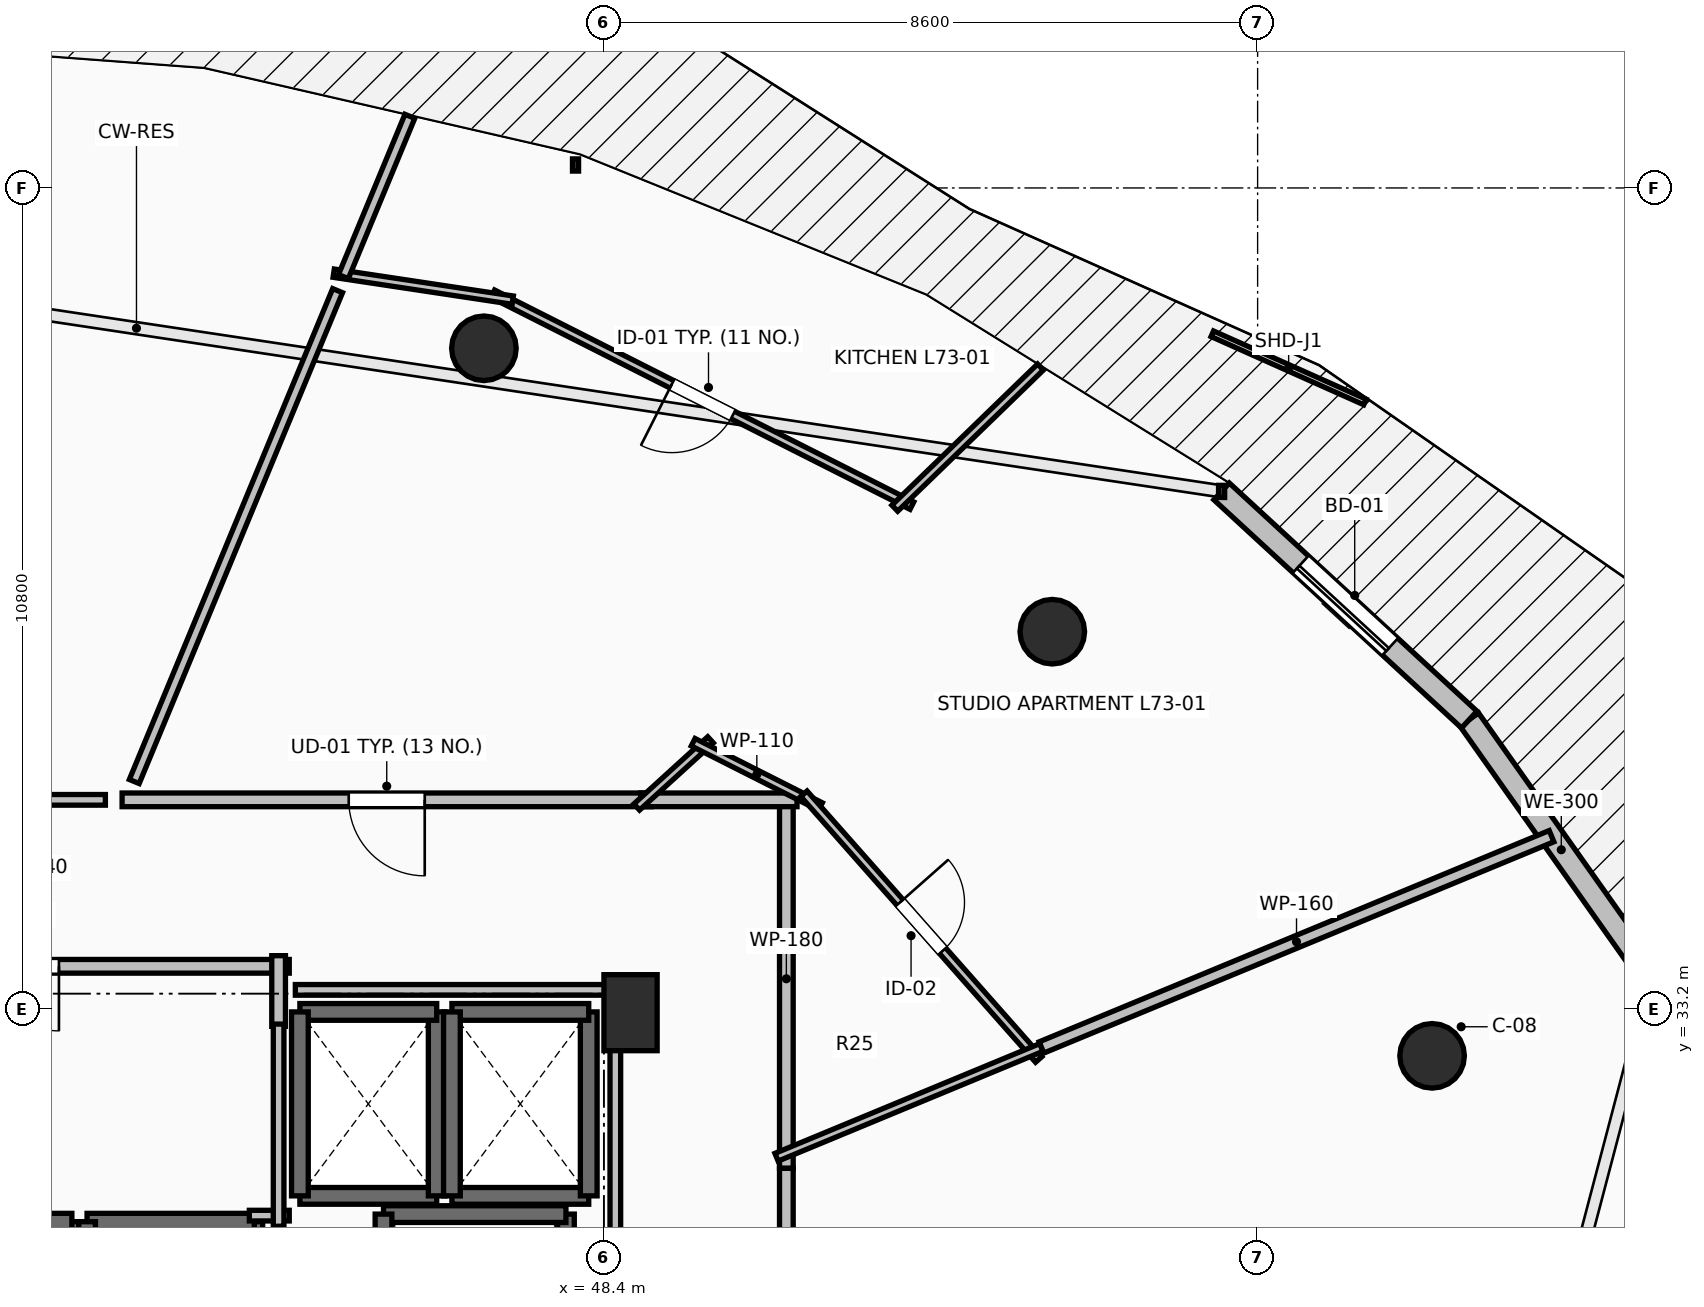
"""IFC4 building model, lengths in metres.
Left out: names, types, materials, properties, quantities, classifications, styles, units other than length and angle.
Written with IfcOpenShell. Run it as: python <this file> out.ifc"""

import sys

from ifc_helpers import new_model, si_unit, direction, frame, frame_2d, origin, origin_2d, place, context, subcontext, project, spatial, rectangle, circle, extrude, element, fill, save


model = new_model("IFC4")
c1 = context("Model", 3, precision=1e-05, world=origin(), true_north=direction((0.0, 1.0)))
c2 = subcontext(c1, "Body", "Model", "MODEL_VIEW")
j1 = project(units=[si_unit("LENGTHUNIT", "METRE"), si_unit("PLANEANGLEUNIT", "RADIAN")], contexts=[c1])
p1 = place(None, origin())
s1 = spatial("IfcSite", under=j1, at=p1, CompositionType="ELEMENT")
p2 = place(p1, origin())
s2 = spatial("IfcBuilding", under=s1, at=p2, CompositionType="ELEMENT")
p3 = place(p2, frame((0.0, 0.0, 269.75)))
s3 = spatial("IfcBuildingStorey", under=s2, at=p3, CompositionType="ELEMENT", Elevation=269.75)
for number, where, z_axis, x_axis in (
    (1, (59.295, 32.582, 0.0), (0.0, 0.0, 1.0), (0.924, 0.383, 0.0)),
    (2, (54.299, 38.162, 0.0), (0.0, 0.0, 1.0), (0.707, 0.707, 0.0)),
    (3, (46.821, 41.891, 0.0), (0.0, 0.0, 1.0), (0.383, 0.924, 0.0)),
):
    element("IfcColumn", number, at=place(p3, frame(where, z_axis=z_axis, x_axis=x_axis)), inside=s3, PredefinedType="COLUMN", context=c2, shape_type="SweptSolid", body=[
        extrude(circle(Radius=0.425, at=origin_2d()), origin(), (0.0, 0.0, 1.0), 3.55),
    ])
p4 = place(p3, frame((48.75, 33.15, 0.0), z_axis=(0.0, 0.0, 1.0), x_axis=(1.0, 0.0, 0.0)))
e4 = element("IfcColumn", 4, at=p4, inside=s3, PredefinedType="PILASTER", context=c2, shape_type="SweptSolid", body=[
    extrude(rectangle(XDim=0.7, YDim=1.0, at=origin_2d()), origin(), (0.0, 0.0, 1.0), 3.55),
])
p5 = place(p3, frame((62.206, 33.581, 0.0), z_axis=(0.0, 0.0, 1.0), x_axis=(-0.577261247247, 0.816559521668, 0.0)))
e5 = element("IfcWall", 5, at=p5, inside=s3, PredefinedType="STANDARD", context=c2, shape_type="SweptSolid", body=[
    extrude(rectangle(XDim=4.194, YDim=0.3, at=frame_2d((2.097, 0.0))), origin(), (0.0, 0.0, 1.0), 3.29),
])
p6 = place(p3, frame((59.784, 37.006, 0.0), z_axis=(0.0, 0.0, 1.0), x_axis=(-0.735445373611, 0.677584018727, 0.0)))
e6 = element("IfcWall", 6, at=p6, inside=s3, PredefinedType="STANDARD", context=c2, shape_type="SweptSolid", body=[
    extrude(rectangle(XDim=4.43, YDim=0.3, at=frame_2d((2.215, 0.0))), origin(), (0.0, 0.0, 1.0), 3.29),
])
p7 = place(p6, frame((1.415, 0.0, 0.0)))
e7 = element("IfcOpeningElement", 7, at=p7, cuts=e6, PredefinedType="OPENING", context=c2, shape_type="SweptSolid", body=[
    extrude(rectangle(XDim=1.6, YDim=2.3, at=frame_2d((0.8, 1.15))), frame((0.0, 0.165, 0.0), z_axis=(0.0, -1.0, 0.0), x_axis=(1.0, 0.0, 0.0)), (0.0, 0.0, 1.0), 0.33),
])
p8 = place(p3, frame((41.4, 27.8, 0.0), z_axis=(0.0, 0.0, 1.0), x_axis=(0.0, 1.0, 0.0)))
e8 = element("IfcWall", 8, at=p8, inside=s3, PredefinedType="SOLIDWALL", context=c2, shape_type="SweptSolid", body=[
    extrude(rectangle(XDim=2.6, YDim=0.22, at=frame_2d((1.3, 0.0))), origin(), (0.0, 0.0, 1.0), 3.29),
])
p9 = place(p3, frame((41.4, 30.4, 0.0), z_axis=(0.0, 0.0, 1.0), x_axis=(-1.0, 0.0, 0.0)))
e9 = element("IfcWall", 9, at=p9, inside=s3, PredefinedType="SOLIDWALL", context=c2, shape_type="SweptSolid", body=[
    extrude(rectangle(XDim=2.2, YDim=0.22, at=frame_2d((1.1, 0.0))), origin(), (0.0, 0.0, 1.0), 3.29),
])
p10 = place(p3, frame((43.8, 27.8, 0.0), z_axis=(0.0, 0.0, 1.0), x_axis=(0.0, 1.0, 0.0)))
e10 = element("IfcWall", 10, at=p10, inside=s3, PredefinedType="SOLIDWALL", context=c2, shape_type="SweptSolid", body=[
    extrude(rectangle(XDim=2.6, YDim=0.22, at=frame_2d((1.3, 0.0))), origin(), (0.0, 0.0, 1.0), 3.29),
])
p11 = place(p3, frame((43.8, 30.4, 0.0), z_axis=(0.0, 0.0, 1.0), x_axis=(-1.0, 0.0, 0.0)))
e11 = element("IfcWall", 11, at=p11, inside=s3, PredefinedType="SOLIDWALL", context=c2, shape_type="SweptSolid", body=[
    extrude(rectangle(XDim=2.2, YDim=0.22, at=frame_2d((1.1, 0.0))), origin(), (0.0, 0.0, 1.0), 3.29),
])
p12 = place(p3, frame((41.6, 30.4, 0.0), z_axis=(0.0, 0.0, 1.0), x_axis=(0.0, -1.0, 0.0)))
e12 = element("IfcWall", 12, at=p12, inside=s3, PredefinedType="SOLIDWALL", context=c2, shape_type="SweptSolid", body=[
    extrude(rectangle(XDim=2.6, YDim=0.22, at=frame_2d((1.3, 0.0))), origin(), (0.0, 0.0, 1.0), 3.29),
])
p13 = place(p3, frame((44.4, 30.74, 0.0), z_axis=(0.0, 0.0, 1.0), x_axis=(1.0, 0.0, 0.0)))
e13 = element("IfcWall", 13, at=p13, inside=s3, PredefinedType="SOLIDWALL", context=c2, shape_type="SweptSolid", body=[
    extrude(rectangle(XDim=1.8, YDim=0.22, at=frame_2d((0.9, 0.0))), origin(), (0.0, 0.0, 1.0), 3.29),
])
p14 = place(p3, frame((46.2, 30.74, 0.0), z_axis=(0.0, 0.0, 1.0), x_axis=(0.0, 1.0, 0.0)))
e14 = element("IfcWall", 14, at=p14, inside=s3, PredefinedType="SOLIDWALL", context=c2, shape_type="SweptSolid", body=[
    extrude(rectangle(XDim=2.42, YDim=0.22, at=frame_2d((1.21, 0.0))), origin(), (0.0, 0.0, 1.0), 3.29),
])
p15 = place(p3, frame((46.2, 33.16, 0.0), z_axis=(0.0, 0.0, 1.0), x_axis=(-1.0, 0.0, 0.0)))
e15 = element("IfcWall", 15, at=p15, inside=s3, PredefinedType="SOLIDWALL", context=c2, shape_type="SweptSolid", body=[
    extrude(rectangle(XDim=1.8, YDim=0.22, at=frame_2d((0.9, 0.0))), origin(), (0.0, 0.0, 1.0), 3.29),
])
p16 = place(p3, frame((44.4, 33.16, 0.0), z_axis=(0.0, 0.0, 1.0), x_axis=(0.0, -1.0, 0.0)))
e16 = element("IfcWall", 16, at=p16, inside=s3, PredefinedType="SOLIDWALL", context=c2, shape_type="SweptSolid", body=[
    extrude(rectangle(XDim=2.42, YDim=0.22, at=frame_2d((1.21, 0.0))), origin(), (0.0, 0.0, 1.0), 3.29),
])
p17 = place(p3, frame((46.4, 30.74, 0.0), z_axis=(0.0, 0.0, 1.0), x_axis=(1.0, 0.0, 0.0)))
e17 = element("IfcWall", 17, at=p17, inside=s3, PredefinedType="SOLIDWALL", context=c2, shape_type="SweptSolid", body=[
    extrude(rectangle(XDim=1.8, YDim=0.22, at=frame_2d((0.9, 0.0))), origin(), (0.0, 0.0, 1.0), 3.29),
])
p18 = place(p3, frame((48.2, 30.74, 0.0), z_axis=(0.0, 0.0, 1.0), x_axis=(0.0, 1.0, 0.0)))
e18 = element("IfcWall", 18, at=p18, inside=s3, PredefinedType="SOLIDWALL", context=c2, shape_type="SweptSolid", body=[
    extrude(rectangle(XDim=2.42, YDim=0.22, at=frame_2d((1.21, 0.0))), origin(), (0.0, 0.0, 1.0), 3.29),
])
p19 = place(p3, frame((48.2, 33.16, 0.0), z_axis=(0.0, 0.0, 1.0), x_axis=(-1.0, 0.0, 0.0)))
e19 = element("IfcWall", 19, at=p19, inside=s3, PredefinedType="SOLIDWALL", context=c2, shape_type="SweptSolid", body=[
    extrude(rectangle(XDim=1.8, YDim=0.22, at=frame_2d((0.9, 0.0))), origin(), (0.0, 0.0, 1.0), 3.29),
])
p20 = place(p3, frame((46.4, 33.16, 0.0), z_axis=(0.0, 0.0, 1.0), x_axis=(0.0, -1.0, 0.0)))
e20 = element("IfcWall", 20, at=p20, inside=s3, PredefinedType="SOLIDWALL", context=c2, shape_type="SweptSolid", body=[
    extrude(rectangle(XDim=2.42, YDim=0.22, at=frame_2d((1.21, 0.0))), origin(), (0.0, 0.0, 1.0), 3.29),
])
p21 = place(p3, frame((47.9, 28.0, 0.0), z_axis=(0.0, 0.0, 1.0), x_axis=(0.0, 1.0, 0.0)))
e21 = element("IfcWall", 21, at=p21, inside=s3, PredefinedType="SHEAR", context=c2, shape_type="SweptSolid", body=[
    extrude(rectangle(XDim=2.5, YDim=0.22, at=frame_2d((1.25, 0.0))), origin(), (0.0, 0.0, 1.0), 3.29),
])
p22 = place(p3, frame((47.9, 30.5, 0.0), z_axis=(0.0, 0.0, 1.0), x_axis=(-1.0, 0.0, 0.0)))
e22 = element("IfcWall", 22, at=p22, inside=s3, PredefinedType="SHEAR", context=c2, shape_type="SweptSolid", body=[
    extrude(rectangle(XDim=2.4, YDim=0.22, at=frame_2d((1.2, 0.0))), origin(), (0.0, 0.0, 1.0), 3.29),
])
p23 = place(p3, frame((45.5, 30.5, 0.0), z_axis=(0.0, 0.0, 1.0), x_axis=(0.0, -1.0, 0.0)))
e23 = element("IfcWall", 23, at=p23, inside=s3, PredefinedType="SHEAR", context=c2, shape_type="SweptSolid", body=[
    extrude(rectangle(XDim=2.5, YDim=0.22, at=frame_2d((1.25, 0.0))), origin(), (0.0, 0.0, 1.0), 3.29),
])
p24 = place(p3, frame((44.26, 33.76, 0.0), z_axis=(0.0, 0.0, 1.0), x_axis=(-1.0, 0.0, 0.0)))
e24 = element("IfcWall", 24, at=p24, inside=s3, PredefinedType="PARTITIONING", context=c2, shape_type="SweptSolid", body=[
    extrude(rectangle(XDim=6.91, YDim=0.18, at=frame_2d((3.455, 0.0))), origin(), (0.0, 0.0, 1.0), 3.29),
])
p25 = place(p24, frame((3.03, 0.0, 0.0)))
e25 = element("IfcOpeningElement", 25, at=p25, cuts=e24, PredefinedType="OPENING", context=c2, shape_type="SweptSolid", body=[
    extrude(rectangle(XDim=0.85, YDim=2.1, at=frame_2d((0.425, 1.05))), frame((0.0, 0.105, 0.0), z_axis=(0.0, -1.0, 0.0), x_axis=(1.0, 0.0, 0.0)), (0.0, 0.0, 1.0), 0.21),
])
p26 = place(p3, frame((44.12, 32.97, 0.0), z_axis=(0.0, 0.0, 1.0), x_axis=(0.0, 1.0, 0.0)))
e26 = element("IfcWall", 26, at=p26, inside=s3, PredefinedType="PARTITIONING", context=c2, shape_type="SweptSolid", body=[
    extrude(rectangle(XDim=0.93, YDim=0.18, at=frame_2d((0.465, 0.0))), origin(), (0.0, 0.0, 1.0), 3.29),
])
p27 = place(p3, frame((49.024, 35.95, 0.0), z_axis=(0.0, 0.0, 1.0), x_axis=(-1.0, 0.0, 0.0)))
e27 = element("IfcWall", 27, at=p27, inside=s3, PredefinedType="PARTITIONING", context=c2, shape_type="SweptSolid", body=[
    extrude(rectangle(XDim=6.963, YDim=0.18, at=frame_2d((3.481, 0.0))), origin(), (0.0, 0.0, 1.0), 2.482),
])
p28 = place(p27, frame((2.981, 0.0, 0.0)))
e28 = element("IfcOpeningElement", 28, at=p28, cuts=e27, PredefinedType="OPENING", context=c2, shape_type="SweptSolid", body=[
    extrude(rectangle(XDim=1.0, YDim=2.15, at=frame_2d((0.5, 1.075))), frame((0.0, 0.105, 0.0), z_axis=(0.0, -1.0, 0.0), x_axis=(1.0, 0.0, 0.0)), (0.0, 0.0, 1.0), 0.21),
])
p29 = place(p3, frame((50.8, 31.102, 0.0), z_axis=(0.0, 0.0, 1.0), x_axis=(0.0, 1.0, 0.0)))
e29 = element("IfcWall", 29, at=p29, inside=s3, PredefinedType="PARTITIONING", context=c2, shape_type="SweptSolid", body=[
    extrude(rectangle(XDim=4.988, YDim=0.18, at=frame_2d((2.494, 0.0))), origin(), (0.0, 0.0, 1.0), 2.482),
])
p30 = place(p3, frame((50.94, 35.95, 0.0), z_axis=(0.0, 0.0, 1.0), x_axis=(-1.0, 0.0, 0.0)))
e30 = element("IfcWall", 30, at=p30, inside=s3, PredefinedType="PARTITIONING", context=c2, shape_type="SweptSolid", body=[
    extrude(rectangle(XDim=2.056, YDim=0.18, at=frame_2d((1.028, 0.0))), origin(), (0.0, 0.0, 1.0), 2.979),
])
p31 = place(p3, frame((50.8, 20.758, 0.0), z_axis=(0.0, 0.0, 1.0), x_axis=(0.0, 1.0, 0.0)))
e31 = element("IfcWall", 31, at=p31, inside=s3, PredefinedType="PARTITIONING", context=c2, shape_type="SweptSolid", body=[
    extrude(rectangle(XDim=10.344, YDim=0.18, at=frame_2d((5.172, 0.0))), origin(), (0.0, 0.0, 1.0), 2.482),
])
p32 = place(p31, frame((4.672, 0.0, 0.0)))
e32 = element("IfcOpeningElement", 32, at=p32, cuts=e31, PredefinedType="OPENING", context=c2, shape_type="SweptSolid", body=[
    extrude(rectangle(XDim=1.0, YDim=2.15, at=frame_2d((0.5, 1.075))), frame((0.0, 0.105, 0.0), z_axis=(0.0, -1.0, 0.0), x_axis=(1.0, 0.0, 0.0)), (0.0, 0.0, 1.0), 0.21),
])
p33 = place(p3, frame((48.831, 35.856, 0.0), z_axis=(0.0, 0.0, 1.0), x_axis=(0.739696022243, 0.672941152463, 0.0)))
e33 = element("IfcWall", 33, at=p33, inside=s3, PredefinedType="PARTITIONING", context=c2, shape_type="SweptSolid", body=[
    extrude(rectangle(XDim=1.313, YDim=0.11, at=frame_2d((0.656, 0.0))), origin(), (0.0, 0.0, 1.0), 2.979),
])
p34 = place(p3, frame((49.574, 36.708, 0.0), z_axis=(0.0, 0.0, 1.0), x_axis=(0.8925722309, -0.450904438464, 0.0)))
e34 = element("IfcWall", 34, at=p34, inside=s3, PredefinedType="PARTITIONING", context=c2, shape_type="SweptSolid", body=[
    extrude(rectangle(XDim=1.877, YDim=0.11, at=frame_2d((0.938, 0.0))), origin(), (0.0, 0.0, 1.0), 3.29),
])
p35 = place(p3, frame((51.031, 36.03, 0.0), z_axis=(0.0, 0.0, 1.0), x_axis=(0.662106207726, -0.749410014405, 0.0)))
e35 = element("IfcWall", 35, at=p35, inside=s3, PredefinedType="PARTITIONING", context=c2, shape_type="SweptSolid", body=[
    extrude(rectangle(XDim=4.665, YDim=0.11, at=frame_2d((2.332, 0.0))), origin(), (0.0, 0.0, 1.0), 2.482),
])
p36 = place(p35, frame((1.907, 0.0, 0.0)))
e36 = element("IfcOpeningElement", 36, at=p36, cuts=e35, PredefinedType="OPENING", context=c2, shape_type="SweptSolid", body=[
    extrude(rectangle(XDim=0.85, YDim=2.1, at=frame_2d((0.425, 1.05))), frame((0.0, 0.07, 0.0), z_axis=(0.0, -1.0, 0.0), x_axis=(1.0, 0.0, 0.0)), (0.0, 0.0, 1.0), 0.14),
])
p37 = place(p3, frame((54.156, 32.693, 0.0), z_axis=(0.0, 0.0, 1.0), x_axis=(-0.923827524065, -0.382808967736, 0.0)))
e37 = element("IfcWall", 37, at=p37, inside=s3, PredefinedType="PARTITIONING", context=c2, shape_type="SweptSolid", body=[
    extrude(rectangle(XDim=3.773, YDim=0.11, at=frame_2d((1.886, 0.0))), origin(), (0.0, 0.0, 1.0), 2.482),
])
p38 = place(p3, frame((52.452, 39.821, 0.0), z_axis=(0.0, 0.0, 1.0), x_axis=(-0.89248283876, 0.451081348007, 0.0)))
e38 = element("IfcWall", 38, at=p38, inside=s3, PredefinedType="PARTITIONING", context=c2, shape_type="SweptSolid", body=[
    extrude(rectangle(XDim=6.179, YDim=0.11, at=frame_2d((3.09, 0.0))), origin(), (0.0, 0.0, 1.0), 3.29),
])
p39 = place(p38, frame((2.64, 0.0, 0.0)))
e39 = element("IfcOpeningElement", 39, at=p39, cuts=e38, PredefinedType="OPENING", context=c2, shape_type="SweptSolid", body=[
    extrude(rectangle(XDim=0.9, YDim=2.1, at=frame_2d((0.45, 1.05))), frame((0.0, 0.07, 0.0), z_axis=(0.0, -1.0, 0.0), x_axis=(1.0, 0.0, 0.0)), (0.0, 0.0, 1.0), 0.14),
])
p40 = place(p3, frame((47.2, 42.524, 0.0), z_axis=(0.0, 0.0, 1.0), x_axis=(-0.988853520249, 0.148891623308, 0.0)))
e40 = element("IfcWall", 40, at=p40, inside=s3, PredefinedType="PARTITIONING", context=c2, shape_type="SweptSolid", body=[
    extrude(rectangle(XDim=2.383, YDim=0.11, at=frame_2d((1.191, 0.0))), origin(), (0.0, 0.0, 1.0), 3.29),
])
p41 = place(p3, frame((54.144, 41.644, 0.0), z_axis=(0.0, 0.0, 1.0), x_axis=(-0.718131661866, -0.695907261225, 0.0)))
e41 = element("IfcWall", 41, at=p41, inside=s3, PredefinedType="PARTITIONING", context=c2, shape_type="SweptSolid", body=[
    extrude(rectangle(XDim=2.669, YDim=0.11, at=frame_2d((1.335, 0.0))), origin(), (0.0, 0.0, 1.0), 3.29),
])
p42 = place(p3, frame((54.156, 32.692, 0.0), z_axis=(0.0, 0.0, 1.0), x_axis=(0.923880411625, 0.382681309989, 0.0)))
e42 = element("IfcWall", 42, at=p42, inside=s3, PredefinedType="PARTITIONING", context=c2, shape_type="SweptSolid", body=[
    extrude(rectangle(XDim=7.263, YDim=0.16, at=frame_2d((3.632, 0.0))), origin(), (0.0, 0.0, 1.0), 2.482),
])
p43 = place(p3, frame((43.735, 30.48, 0.0), z_axis=(0.0, 0.0, 1.0), x_axis=(1.0, 0.0, 0.0)))
e43 = element("IfcWall", 43, at=p43, inside=s3, PredefinedType="PARTITIONING", context=c2, shape_type="SweptSolid", body=[
    extrude(rectangle(XDim=0.525, YDim=0.14, at=frame_2d((0.262, 0.0))), origin(), (0.0, 0.0, 1.0), 3.29),
])
p44 = place(p3, frame((44.12, 30.34, 0.0), z_axis=(0.0, 0.0, 1.0), x_axis=(0.0, 1.0, 0.0)))
e44 = element("IfcWall", 44, at=p44, inside=s3, PredefinedType="PARTITIONING", context=c2, shape_type="SweptSolid", body=[
    extrude(rectangle(XDim=2.66, YDim=0.14, at=frame_2d((1.33, 0.0))), origin(), (0.0, 0.0, 1.0), 3.29),
])
p45 = place(p3, frame((41.841, 35.95, 0.0), z_axis=(0.0, 0.0, 1.0), x_axis=(-1.0, 0.0, 0.0)))
e45 = element("IfcWall", 45, at=p45, inside=s3, PredefinedType="PARTITIONING", context=c2, shape_type="SweptSolid", body=[
    extrude(rectangle(XDim=2.391, YDim=0.14, at=frame_2d((1.196, 0.0))), origin(), (0.0, 0.0, 1.0), 3.29),
])
p46 = place(p3, frame((48.55, 28.196, 0.0), z_axis=(0.0, 0.0, 1.0), x_axis=(0.0, 1.0, 0.0)))
e46 = element("IfcWall", 46, at=p46, inside=s3, PredefinedType="PARTITIONING", context=c2, shape_type="SweptSolid", body=[
    extrude(rectangle(XDim=5.254, YDim=0.14, at=frame_2d((2.627, 0.0))), origin(), (0.0, 0.0, 1.0), 2.482),
])
p47 = place(p3, frame((48.55, 33.45, 0.0), z_axis=(0.0, 0.0, 1.0), x_axis=(-1.0, 0.0, 0.0)))
e47 = element("IfcWall", 47, at=p47, inside=s3, PredefinedType="PARTITIONING", context=c2, shape_type="SweptSolid", body=[
    extrude(rectangle(XDim=4.21, YDim=0.14, at=frame_2d((2.105, 0.0))), origin(), (0.0, 0.0, 1.0), 2.482),
])
p48 = place(p3, frame((44.896, 42.649, 0.0), z_axis=(0.0, 0.0, 1.0), x_axis=(-0.382690075828, -0.923876780671, 0.0)))
e48 = element("IfcWall", 48, at=p48, inside=s3, PredefinedType="PARTITIONING", context=c2, shape_type="SweptSolid", body=[
    extrude(rectangle(XDim=6.99, YDim=0.14, at=frame_2d((3.495, 0.0))), origin(), (0.0, 0.0, 1.0), 2.874),
])
p49 = place(p3, frame((45.847, 44.942, 0.0), z_axis=(0.0, 0.0, 1.0), x_axis=(-0.382997215295, -0.923749496929, 0.0)))
e49 = element("IfcWall", 49, at=p49, inside=s3, PredefinedType="PARTITIONING", context=c2, shape_type="SweptSolid", body=[
    extrude(rectangle(XDim=2.283, YDim=0.14, at=frame_2d((1.141, 0.0))), origin(), (0.0, 0.0, 1.0), 3.29),
])
p50 = place(p7, origin())
e50 = element("IfcDoor", 50, at=p50, inside=s3, OperationType="SLIDING_TO_LEFT", PredefinedType="DOOR", context=c2, shape_type="SweptSolid", body=[
    extrude(rectangle(XDim=1.6, YDim=2.3, at=frame_2d((0.8, 1.15))), frame((0.0, 0.025, 0.0), z_axis=(0.0, -1.0, 0.0), x_axis=(1.0, 0.0, 0.0)), (0.0, 0.0, 1.0), 0.05),
])
fill(e7, e50)
p51 = place(p25, origin())
e51 = element("IfcDoor", 51, at=p51, inside=s3, OperationType="SINGLE_SWING_LEFT", PredefinedType="DOOR", context=c2, shape_type="SweptSolid", body=[
    extrude(rectangle(XDim=0.85, YDim=2.1, at=frame_2d((0.425, 1.05))), frame((0.0, 0.025, 0.0), z_axis=(0.0, -1.0, 0.0), x_axis=(1.0, 0.0, 0.0)), (0.0, 0.0, 1.0), 0.05),
])
fill(e25, e51)
p52 = place(p28, origin())
e52 = element("IfcDoor", 52, at=p52, inside=s3, OperationType="SINGLE_SWING_LEFT", PredefinedType="DOOR", context=c2, shape_type="SweptSolid", body=[
    extrude(rectangle(XDim=1.0, YDim=2.15, at=frame_2d((0.5, 1.075))), frame((0.0, 0.025, 0.0), z_axis=(0.0, -1.0, 0.0), x_axis=(1.0, 0.0, 0.0)), (0.0, 0.0, 1.0), 0.05),
])
fill(e28, e52)
p53 = place(p36, origin())
e53 = element("IfcDoor", 53, at=p53, inside=s3, OperationType="SINGLE_SWING_LEFT", PredefinedType="DOOR", context=c2, shape_type="SweptSolid", body=[
    extrude(rectangle(XDim=0.85, YDim=2.1, at=frame_2d((0.425, 1.05))), frame((0.0, 0.025, 0.0), z_axis=(0.0, -1.0, 0.0), x_axis=(1.0, 0.0, 0.0)), (0.0, 0.0, 1.0), 0.05),
])
fill(e36, e53)
p54 = place(p39, origin())
e54 = element("IfcDoor", 54, at=p54, inside=s3, OperationType="SINGLE_SWING_RIGHT", PredefinedType="DOOR", context=c2, shape_type="SweptSolid", body=[
    extrude(rectangle(XDim=0.9, YDim=2.1, at=frame_2d((0.45, 1.05))), frame((0.0, 0.025, 0.0), z_axis=(0.0, -1.0, 0.0), x_axis=(1.0, 0.0, 0.0)), (0.0, 0.0, 1.0), 0.05),
])
fill(e39, e54)
save(model, sys.argv[1])
